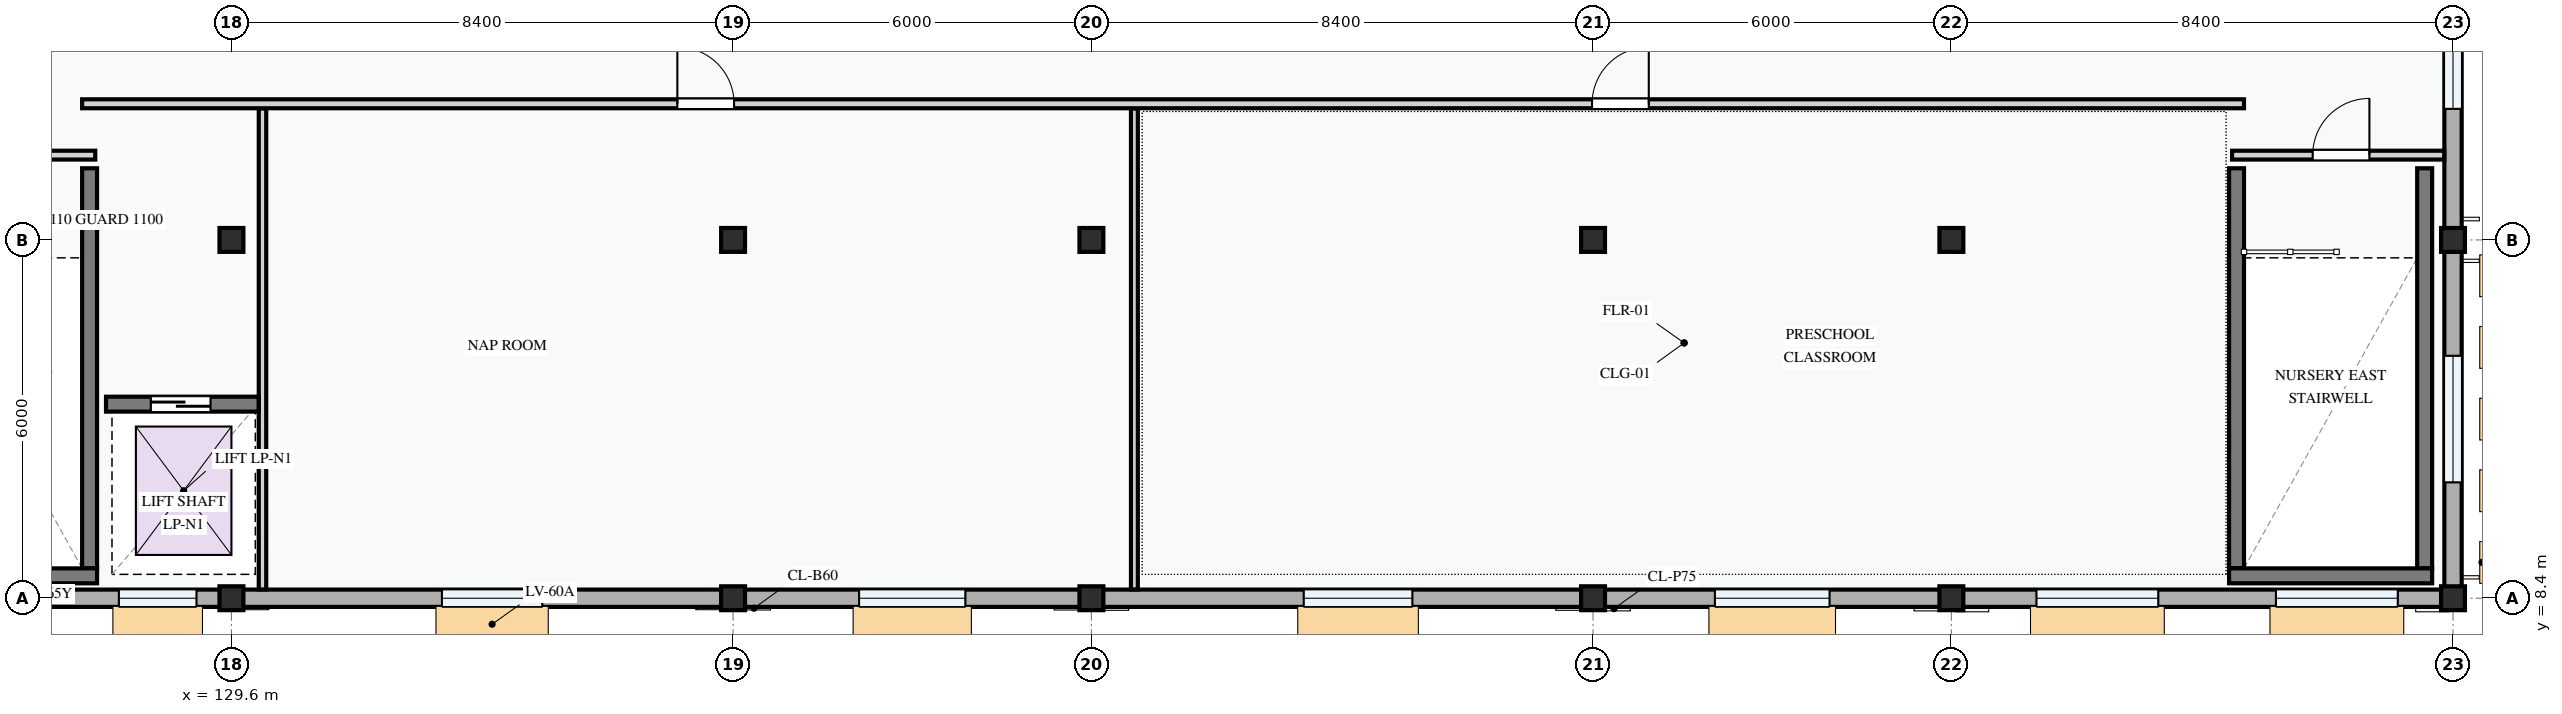
"""IFC4 building model, lengths in metres.
Left out: names, types, materials, properties, quantities, classifications, styles, units other than length and angle.
Written with IfcOpenShell. Run it as: python <this file> out.ifc"""

import sys

from ifc_helpers import new_model, si_unit, direction, frame, frame_2d, origin, origin_2d, place, context, subcontext, project, spatial, rectangle, extrude, element, fill, save


model = new_model("IFC4")
c1 = context("Model", 3, precision=1e-05, world=origin(), true_north=direction((0.0, 1.0)))
c2 = subcontext(c1, "Body", "Model", "MODEL_VIEW")
j1 = project(units=[si_unit("LENGTHUNIT", "METRE"), si_unit("PLANEANGLEUNIT", "RADIAN")], contexts=[c1])
p1 = place(None, origin())
s1 = spatial("IfcSite", under=j1, at=p1, CompositionType="ELEMENT")
p2 = place(p1, origin())
s2 = spatial("IfcBuilding", under=s1, at=p2, CompositionType="ELEMENT")
p3 = place(p2, frame((0.0, 0.0, 4.5)))
s3 = spatial("IfcBuildingStorey", under=s2, at=p3, CompositionType="ELEMENT", Elevation=4.5)
for number, where, z_axis, x_axis in (
    (1, (129.6, 8.4, 0.0), (0.0, 0.0, 1.0), (1.0, 0.0, 0.0)),
    (2, (129.6, 14.4, 0.0), (0.0, 0.0, 1.0), (1.0, 0.0, 0.0)),
    (3, (138.0, 8.4, 0.0), (0.0, 0.0, 1.0), (1.0, 0.0, 0.0)),
    (4, (138.0, 14.4, 0.0), (0.0, 0.0, 1.0), (1.0, 0.0, 0.0)),
    (5, (144.0, 8.4, 0.0), (0.0, 0.0, 1.0), (1.0, 0.0, 0.0)),
    (6, (144.0, 14.4, 0.0), (0.0, 0.0, 1.0), (1.0, 0.0, 0.0)),
    (7, (152.4, 8.4, 0.0), (0.0, 0.0, 1.0), (1.0, 0.0, 0.0)),
    (8, (152.4, 14.4, 0.0), (0.0, 0.0, 1.0), (1.0, 0.0, 0.0)),
    (9, (158.4, 8.4, 0.0), (0.0, 0.0, 1.0), (1.0, 0.0, 0.0)),
    (10, (158.4, 14.4, 0.0), (0.0, 0.0, 1.0), (1.0, 0.0, 0.0)),
    (11, (166.8, 8.4, 0.0), (0.0, 0.0, 1.0), (1.0, 0.0, 0.0)),
    (12, (166.8, 14.4, 0.0), (0.0, 0.0, 1.0), (1.0, 0.0, 0.0)),
):
    element("IfcColumn", number, at=place(p3, frame(where, z_axis=z_axis, x_axis=x_axis)), inside=s3, PredefinedType="COLUMN", context=c2, shape_type="SweptSolid", body=[
        extrude(rectangle(XDim=0.4, YDim=0.4, at=origin_2d()), origin(), (0.0, 0.0, 1.0), 3.6),
    ])
p4 = place(p3, frame((123.6, 8.4, 0.0), z_axis=(0.0, 0.0, 1.0), x_axis=(1.0, 0.0, 0.0)))
e13 = element("IfcWall", 13, at=p4, inside=s3, PredefinedType="STANDARD", context=c2, shape_type="SweptSolid", body=[
    extrude(rectangle(XDim=6.0, YDim=0.29, at=frame_2d((3.0, 0.0))), origin(), (0.0, 0.0, 1.0), 2.775),
])
p5 = place(p4, frame((1.145, 0.0, 0.72)))
e14 = element("IfcOpeningElement", 14, at=p5, cuts=e13, PredefinedType="OPENING", context=c2, shape_type="SweptSolid", body=[
    extrude(rectangle(XDim=1.62, YDim=1.38, at=frame_2d((0.81, 0.69))), frame((0.0, 0.155, 0.0), z_axis=(0.0, -1.0, 0.0), x_axis=(1.0, 0.0, 0.0)), (0.0, 0.0, 1.0), 0.31),
])
p6 = place(p4, frame((4.115, 0.0, 0.72)))
e15 = element("IfcOpeningElement", 15, at=p6, cuts=e13, PredefinedType="OPENING", context=c2, shape_type="SweptSolid", body=[
    extrude(rectangle(XDim=1.3, YDim=1.4, at=frame_2d((0.65, 0.7))), frame((0.0, 0.155, 0.0), z_axis=(0.0, -1.0, 0.0), x_axis=(1.0, 0.0, 0.0)), (0.0, 0.0, 1.0), 0.31),
])
p7 = place(p3, frame((129.6, 8.4, 0.0), z_axis=(0.0, 0.0, 1.0), x_axis=(1.0, 0.0, 0.0)))
e16 = element("IfcWall", 16, at=p7, inside=s3, PredefinedType="STANDARD", context=c2, shape_type="SweptSolid", body=[
    extrude(rectangle(XDim=8.4, YDim=0.29, at=frame_2d((4.2, 0.0))), origin(), (0.0, 0.0, 1.0), 2.675),
])
p8 = place(p7, frame((3.525, 0.0, 0.72)))
e17 = element("IfcOpeningElement", 17, at=p8, cuts=e16, PredefinedType="OPENING", context=c2, shape_type="SweptSolid", body=[
    extrude(rectangle(XDim=1.68, YDim=1.46, at=frame_2d((0.84, 0.73))), frame((0.0, 0.155, 0.0), z_axis=(0.0, -1.0, 0.0), x_axis=(1.0, 0.0, 0.0)), (0.0, 0.0, 1.0), 0.31),
])
p9 = place(p3, frame((138.0, 8.4, 0.0), z_axis=(0.0, 0.0, 1.0), x_axis=(1.0, 0.0, 0.0)))
e18 = element("IfcWall", 18, at=p9, inside=s3, PredefinedType="STANDARD", context=c2, shape_type="SweptSolid", body=[
    extrude(rectangle(XDim=6.0, YDim=0.29, at=frame_2d((3.0, 0.0))), origin(), (0.0, 0.0, 1.0), 2.775),
])
p10 = place(p9, frame((2.11, 0.0, 0.72)))
e19 = element("IfcOpeningElement", 19, at=p10, cuts=e18, PredefinedType="OPENING", context=c2, shape_type="SweptSolid", body=[
    extrude(rectangle(XDim=1.78, YDim=1.42, at=frame_2d((0.89, 0.71))), frame((0.0, 0.155, 0.0), z_axis=(0.0, -1.0, 0.0), x_axis=(1.0, 0.0, 0.0)), (0.0, 0.0, 1.0), 0.31),
])
p11 = place(p3, frame((144.0, 8.4, 0.0), z_axis=(0.0, 0.0, 1.0), x_axis=(1.0, 0.0, 0.0)))
e20 = element("IfcWall", 20, at=p11, inside=s3, PredefinedType="STANDARD", context=c2, shape_type="SweptSolid", body=[
    extrude(rectangle(XDim=8.4, YDim=0.29, at=frame_2d((4.2, 0.0))), origin(), (0.0, 0.0, 1.0), 2.675),
])
p12 = place(p11, frame((3.555, 0.0, 0.72)))
e21 = element("IfcOpeningElement", 21, at=p12, cuts=e20, PredefinedType="OPENING", context=c2, shape_type="SweptSolid", body=[
    extrude(rectangle(XDim=1.82, YDim=1.46, at=frame_2d((0.91, 0.73))), frame((0.0, 0.155, 0.0), z_axis=(0.0, -1.0, 0.0), x_axis=(1.0, 0.0, 0.0)), (0.0, 0.0, 1.0), 0.31),
])
p13 = place(p3, frame((152.4, 8.4, 0.0), z_axis=(0.0, 0.0, 1.0), x_axis=(1.0, 0.0, 0.0)))
e22 = element("IfcWall", 22, at=p13, inside=s3, PredefinedType="STANDARD", context=c2, shape_type="SweptSolid", body=[
    extrude(rectangle(XDim=6.0, YDim=0.29, at=frame_2d((3.0, 0.0))), origin(), (0.0, 0.0, 1.0), 2.775),
])
p14 = place(p13, frame((2.04, 0.0, 0.72)))
e23 = element("IfcOpeningElement", 23, at=p14, cuts=e22, PredefinedType="OPENING", context=c2, shape_type="SweptSolid", body=[
    extrude(rectangle(XDim=1.92, YDim=1.44, at=frame_2d((0.96, 0.72))), frame((0.0, 0.155, 0.0), z_axis=(0.0, -1.0, 0.0), x_axis=(1.0, 0.0, 0.0)), (0.0, 0.0, 1.0), 0.31),
])
p15 = place(p3, frame((158.4, 8.4, 0.0), z_axis=(0.0, 0.0, 1.0), x_axis=(1.0, 0.0, 0.0)))
e24 = element("IfcWall", 24, at=p15, inside=s3, PredefinedType="STANDARD", context=c2, shape_type="SweptSolid", body=[
    extrude(rectangle(XDim=8.4, YDim=0.29, at=frame_2d((4.2, 0.0))), origin(), (0.0, 0.0, 1.0), 2.675),
])
p16 = place(p15, frame((1.425, 0.0, 0.72)))
e25 = element("IfcOpeningElement", 25, at=p16, cuts=e24, PredefinedType="OPENING", context=c2, shape_type="SweptSolid", body=[
    extrude(rectangle(XDim=2.04, YDim=1.46, at=frame_2d((1.02, 0.73))), frame((0.0, 0.155, 0.0), z_axis=(0.0, -1.0, 0.0), x_axis=(1.0, 0.0, 0.0)), (0.0, 0.0, 1.0), 0.31),
])
p17 = place(p15, frame((5.435, 0.0, 0.72)))
e26 = element("IfcOpeningElement", 26, at=p17, cuts=e24, PredefinedType="OPENING", context=c2, shape_type="SweptSolid", body=[
    extrude(rectangle(XDim=2.04, YDim=1.46, at=frame_2d((1.02, 0.73))), frame((0.0, 0.155, 0.0), z_axis=(0.0, -1.0, 0.0), x_axis=(1.0, 0.0, 0.0)), (0.0, 0.0, 1.0), 0.31),
])
p18 = place(p3, frame((166.8, 8.4, 0.0), z_axis=(0.0, 0.0, 1.0), x_axis=(0.0, 1.0, 0.0)))
e27 = element("IfcWall", 27, at=p18, inside=s3, PredefinedType="STANDARD", context=c2, shape_type="SweptSolid", body=[
    extrude(rectangle(XDim=6.0, YDim=0.29, at=frame_2d((3.0, 0.0))), origin(), (0.0, 0.0, 1.0), 2.875),
])
p19 = place(p18, frame((1.94, 0.0, 0.72)))
e28 = element("IfcOpeningElement", 28, at=p19, cuts=e27, PredefinedType="OPENING", context=c2, shape_type="SweptSolid", body=[
    extrude(rectangle(XDim=2.12, YDim=1.44, at=frame_2d((1.06, 0.72))), frame((0.0, 0.155, 0.0), z_axis=(0.0, -1.0, 0.0), x_axis=(1.0, 0.0, 0.0)), (0.0, 0.0, 1.0), 0.31),
])
p20 = place(p3, frame((166.8, 14.4, 0.0), z_axis=(0.0, 0.0, 1.0), x_axis=(0.0, 1.0, 0.0)))
e29 = element("IfcWall", 29, at=p20, inside=s3, PredefinedType="STANDARD", context=c2, shape_type="SweptSolid", body=[
    extrude(rectangle(XDim=8.4, YDim=0.29, at=frame_2d((4.2, 0.0))), origin(), (0.0, 0.0, 1.0), 2.725),
])
p21 = place(p20, frame((2.195, 0.0, 0.72)))
e30 = element("IfcOpeningElement", 30, at=p21, cuts=e29, PredefinedType="OPENING", context=c2, shape_type="SweptSolid", body=[
    extrude(rectangle(XDim=1.55, YDim=1.4, at=frame_2d((0.775, 0.7))), frame((0.0, 0.155, 0.0), z_axis=(0.0, -1.0, 0.0), x_axis=(1.0, 0.0, 0.0)), (0.0, 0.0, 1.0), 0.31),
])
p22 = place(p20, frame((5.275, 0.0, 0.72)))
e31 = element("IfcOpeningElement", 31, at=p22, cuts=e29, PredefinedType="OPENING", context=c2, shape_type="SweptSolid", body=[
    extrude(rectangle(XDim=2.18, YDim=1.48, at=frame_2d((1.09, 0.74))), frame((0.0, 0.155, 0.0), z_axis=(0.0, -1.0, 0.0), x_axis=(1.0, 0.0, 0.0)), (0.0, 0.0, 1.0), 0.31),
])
p23 = place(p3, frame((127.225, 15.6, 0.0), z_axis=(0.0, 0.0, 1.0), x_axis=(0.0, -1.0, 0.0)))
e32 = element("IfcWall", 32, at=p23, inside=s3, PredefinedType="SHEAR", context=c2, shape_type="SweptSolid", body=[
    extrude(rectangle(XDim=6.7, YDim=0.25, at=frame_2d((3.35, 0.0))), origin(), (0.0, 0.0, 1.0), 3.3),
])
p24 = place(p3, frame((123.95, 8.775, 0.0), z_axis=(0.0, 0.0, 1.0), x_axis=(1.0, 0.0, 0.0)))
e33 = element("IfcWall", 33, at=p24, inside=s3, PredefinedType="SHEAR", context=c2, shape_type="SweptSolid", body=[
    extrude(rectangle(XDim=3.4, YDim=0.25, at=frame_2d((1.7, 0.0))), origin(), (0.0, 0.0, 1.0), 3.3),
])
for number, where, z_axis, x_axis in (
    (34, (163.175, 15.6, 0.0), (0.0, 0.0, 1.0), (0.0, -1.0, 0.0)),
    (35, (166.325, 15.6, 0.0), (0.0, 0.0, 1.0), (0.0, -1.0, 0.0)),
):
    element("IfcWall", number, at=place(p3, frame(where, z_axis=z_axis, x_axis=x_axis)), inside=s3, PredefinedType="SHEAR", context=c2, shape_type="SweptSolid", body=[
        extrude(rectangle(XDim=6.7, YDim=0.25, at=frame_2d((3.35, 0.0))), origin(), (0.0, 0.0, 1.0), 3.3),
    ])
p25 = place(p3, frame((163.05, 8.775, 0.0), z_axis=(0.0, 0.0, 1.0), x_axis=(1.0, 0.0, 0.0)))
e36 = element("IfcWall", 36, at=p25, inside=s3, PredefinedType="SHEAR", context=c2, shape_type="SweptSolid", body=[
    extrude(rectangle(XDim=3.4, YDim=0.25, at=frame_2d((1.7, 0.0))), origin(), (0.0, 0.0, 1.0), 3.3),
])
p26 = place(p3, frame((130.12, 8.547, 0.0), z_axis=(0.0, 0.0, 1.0), x_axis=(0.0, 1.0, 0.0)))
e37 = element("IfcWall", 37, at=p26, inside=s3, PredefinedType="PARTITIONING", context=c2, shape_type="SweptSolid", body=[
    extrude(rectangle(XDim=8.056, YDim=0.125, at=frame_2d((4.028, 0.0))), origin(), (0.0, 0.0, 1.0), 3.3),
])
p27 = place(p3, frame((144.72, 8.547, 0.0), z_axis=(0.0, 0.0, 1.0), x_axis=(0.0, 1.0, 0.0)))
e38 = element("IfcWall", 38, at=p27, inside=s3, PredefinedType="PARTITIONING", context=c2, shape_type="SweptSolid", body=[
    extrude(rectangle(XDim=8.056, YDim=0.115, at=frame_2d((4.028, 0.0))), origin(), (0.0, 0.0, 1.0), 3.3),
])
p28 = place(p3, frame((127.1, 16.68, 0.0), z_axis=(0.0, 0.0, 1.0), x_axis=(1.0, 0.0, 0.0)))
e39 = element("IfcWall", 39, at=p28, inside=s3, PredefinedType="PARTITIONING", context=c2, shape_type="SweptSolid", body=[
    extrude(rectangle(XDim=36.2, YDim=0.15, at=frame_2d((18.1, 0.0))), origin(), (0.0, 0.0, 1.0), 3.3),
])
p29 = place(p28, frame((9.967, 0.0, 0.0)))
e40 = element("IfcOpeningElement", 40, at=p29, cuts=e39, PredefinedType="OPENING", context=c2, shape_type="SweptSolid", body=[
    extrude(rectangle(XDim=0.95, YDim=2.1, at=frame_2d((0.475, 1.05))), frame((0.0, 0.085, 0.0), z_axis=(0.0, -1.0, 0.0), x_axis=(1.0, 0.0, 0.0)), (0.0, 0.0, 1.0), 0.17),
])
p30 = place(p28, frame((25.283, 0.0, 0.0)))
e41 = element("IfcOpeningElement", 41, at=p30, cuts=e39, PredefinedType="OPENING", context=c2, shape_type="SweptSolid", body=[
    extrude(rectangle(XDim=0.95, YDim=2.1, at=frame_2d((0.475, 1.05))), frame((0.0, 0.085, 0.0), z_axis=(0.0, -1.0, 0.0), x_axis=(1.0, 0.0, 0.0)), (0.0, 0.0, 1.0), 0.17),
])
p31 = place(p3, frame((127.5, 11.65, 0.0), z_axis=(0.0, 0.0, 1.0), x_axis=(1.0, 0.0, 0.0)))
e42 = element("IfcWall", 42, at=p31, inside=s3, PredefinedType="SHEAR", context=c2, shape_type="SweptSolid", body=[
    extrude(rectangle(XDim=2.555, YDim=0.25, at=frame_2d((1.278, 0.0))), origin(), (0.0, 0.0, 1.0), 3.3),
])
p32 = place(p31, frame((0.75, 0.0, 0.0)))
e43 = element("IfcOpeningElement", 43, at=p32, cuts=e42, PredefinedType="OPENING", context=c2, shape_type="SweptSolid", body=[
    extrude(rectangle(XDim=1.0, YDim=2.15, at=frame_2d((0.5, 1.075))), frame((0.0, 0.135, 0.0), z_axis=(0.0, -1.0, 0.0), x_axis=(1.0, 0.0, 0.0)), (0.0, 0.0, 1.0), 0.27),
])
p33 = place(p3, frame((123.747, 15.82, 0.0), z_axis=(0.0, 0.0, 1.0), x_axis=(1.0, 0.0, 0.0)))
e44 = element("IfcWall", 44, at=p33, inside=s3, PredefinedType="PARTITIONING", context=c2, shape_type="SweptSolid", body=[
    extrude(rectangle(XDim=3.573, YDim=0.148, at=frame_2d((1.787, 0.0))), origin(), (0.0, 0.0, 1.0), 3.3),
])
p34 = place(p33, frame((1.263, 0.0, 0.0)))
e45 = element("IfcOpeningElement", 45, at=p34, cuts=e44, PredefinedType="OPENING", context=c2, shape_type="SweptSolid", body=[
    extrude(rectangle(XDim=0.95, YDim=2.1, at=frame_2d((0.475, 1.05))), frame((0.0, 0.084, 0.0), z_axis=(0.0, -1.0, 0.0), x_axis=(1.0, 0.0, 0.0)), (0.0, 0.0, 1.0), 0.168),
])
p35 = place(p3, frame((163.1, 15.82, 0.0), z_axis=(0.0, 0.0, 1.0), x_axis=(1.0, 0.0, 0.0)))
e46 = element("IfcWall", 46, at=p35, inside=s3, PredefinedType="PARTITIONING", context=c2, shape_type="SweptSolid", body=[
    extrude(rectangle(XDim=3.553, YDim=0.148, at=frame_2d((1.776, 0.0))), origin(), (0.0, 0.0, 1.0), 3.3),
])
p36 = place(p35, frame((1.35, 0.0, 0.0)))
e47 = element("IfcOpeningElement", 47, at=p36, cuts=e46, PredefinedType="OPENING", context=c2, shape_type="SweptSolid", body=[
    extrude(rectangle(XDim=0.95, YDim=2.1, at=frame_2d((0.475, 1.05))), frame((0.0, 0.084, 0.0), z_axis=(0.0, -1.0, 0.0), x_axis=(1.0, 0.0, 0.0)), (0.0, 0.0, 1.0), 0.168),
])
p37 = place(p6, origin())
e48 = element("IfcWindow", 48, at=p37, inside=s3, PartitioningType="SINGLE_PANEL", PredefinedType="WINDOW", context=c2, shape_type="SweptSolid", body=[
    extrude(rectangle(XDim=1.3, YDim=1.4, at=frame_2d((0.65, 0.7))), frame((0.0, 0.03, 0.0), z_axis=(0.0, -1.0, 0.0), x_axis=(1.0, 0.0, 0.0)), (0.0, 0.0, 1.0), 0.06),
])
fill(e15, e48)
p38 = place(p8, origin())
e49 = element("IfcWindow", 49, at=p38, inside=s3, PartitioningType="DOUBLE_PANEL_VERTICAL", PredefinedType="WINDOW", context=c2, shape_type="SweptSolid", body=[
    extrude(rectangle(XDim=1.68, YDim=1.46, at=frame_2d((0.84, 0.73))), frame((0.0, 0.03, 0.0), z_axis=(0.0, -1.0, 0.0), x_axis=(1.0, 0.0, 0.0)), (0.0, 0.0, 1.0), 0.06),
])
fill(e17, e49)
p39 = place(p10, origin())
e50 = element("IfcWindow", 50, at=p39, inside=s3, PartitioningType="DOUBLE_PANEL_VERTICAL", PredefinedType="WINDOW", context=c2, shape_type="SweptSolid", body=[
    extrude(rectangle(XDim=1.78, YDim=1.42, at=frame_2d((0.89, 0.71))), frame((0.0, 0.03, 0.0), z_axis=(0.0, -1.0, 0.0), x_axis=(1.0, 0.0, 0.0)), (0.0, 0.0, 1.0), 0.06),
])
fill(e19, e50)
p40 = place(p12, origin())
e51 = element("IfcWindow", 51, at=p40, inside=s3, PartitioningType="DOUBLE_PANEL_VERTICAL", PredefinedType="WINDOW", context=c2, shape_type="SweptSolid", body=[
    extrude(rectangle(XDim=1.82, YDim=1.46, at=frame_2d((0.91, 0.73))), frame((0.0, 0.03, 0.0), z_axis=(0.0, -1.0, 0.0), x_axis=(1.0, 0.0, 0.0)), (0.0, 0.0, 1.0), 0.06),
])
fill(e21, e51)
p41 = place(p14, origin())
e52 = element("IfcWindow", 52, at=p41, inside=s3, PartitioningType="DOUBLE_PANEL_VERTICAL", PredefinedType="WINDOW", context=c2, shape_type="SweptSolid", body=[
    extrude(rectangle(XDim=1.92, YDim=1.44, at=frame_2d((0.96, 0.72))), frame((0.0, 0.03, 0.0), z_axis=(0.0, -1.0, 0.0), x_axis=(1.0, 0.0, 0.0)), (0.0, 0.0, 1.0), 0.06),
])
fill(e23, e52)
p42 = place(p16, origin())
e53 = element("IfcWindow", 53, at=p42, inside=s3, PartitioningType="DOUBLE_PANEL_VERTICAL", PredefinedType="WINDOW", context=c2, shape_type="SweptSolid", body=[
    extrude(rectangle(XDim=2.04, YDim=1.46, at=frame_2d((1.02, 0.73))), frame((0.0, 0.03, 0.0), z_axis=(0.0, -1.0, 0.0), x_axis=(1.0, 0.0, 0.0)), (0.0, 0.0, 1.0), 0.06),
])
fill(e25, e53)
p43 = place(p17, origin())
e54 = element("IfcWindow", 54, at=p43, inside=s3, PartitioningType="DOUBLE_PANEL_VERTICAL", PredefinedType="WINDOW", context=c2, shape_type="SweptSolid", body=[
    extrude(rectangle(XDim=2.04, YDim=1.46, at=frame_2d((1.02, 0.73))), frame((0.0, 0.03, 0.0), z_axis=(0.0, -1.0, 0.0), x_axis=(1.0, 0.0, 0.0)), (0.0, 0.0, 1.0), 0.06),
])
fill(e26, e54)
p44 = place(p19, origin())
e55 = element("IfcWindow", 55, at=p44, inside=s3, PartitioningType="DOUBLE_PANEL_VERTICAL", PredefinedType="WINDOW", context=c2, shape_type="SweptSolid", body=[
    extrude(rectangle(XDim=2.12, YDim=1.44, at=frame_2d((1.06, 0.72))), frame((0.0, 0.03, 0.0), z_axis=(0.0, -1.0, 0.0), x_axis=(1.0, 0.0, 0.0)), (0.0, 0.0, 1.0), 0.06),
])
fill(e28, e55)
p45 = place(p21, origin())
e56 = element("IfcWindow", 56, at=p45, inside=s3, PartitioningType="SINGLE_PANEL", PredefinedType="WINDOW", context=c2, shape_type="SweptSolid", body=[
    extrude(rectangle(XDim=1.55, YDim=1.4, at=frame_2d((0.775, 0.7))), frame((0.0, 0.03, 0.0), z_axis=(0.0, -1.0, 0.0), x_axis=(1.0, 0.0, 0.0)), (0.0, 0.0, 1.0), 0.06),
])
fill(e30, e56)
p46 = place(p29, origin())
e57 = element("IfcDoor", 57, at=p46, inside=s3, OperationType="SINGLE_SWING_LEFT", PredefinedType="DOOR", context=c2, shape_type="SweptSolid", body=[
    extrude(rectangle(XDim=0.95, YDim=2.1, at=frame_2d((0.475, 1.05))), frame((0.0, 0.025, 0.0), z_axis=(0.0, -1.0, 0.0), x_axis=(1.0, 0.0, 0.0)), (0.0, 0.0, 1.0), 0.05),
])
fill(e40, e57)
p47 = place(p30, origin())
e58 = element("IfcDoor", 58, at=p47, inside=s3, OperationType="SINGLE_SWING_RIGHT", PredefinedType="DOOR", context=c2, shape_type="SweptSolid", body=[
    extrude(rectangle(XDim=0.95, YDim=2.1, at=frame_2d((0.475, 1.05))), frame((0.0, 0.025, 0.0), z_axis=(0.0, -1.0, 0.0), x_axis=(1.0, 0.0, 0.0)), (0.0, 0.0, 1.0), 0.05),
])
fill(e41, e58)
p48 = place(p32, origin())
e59 = element("IfcDoor", 59, at=p48, inside=s3, OperationType="SLIDING_TO_LEFT", PredefinedType="DOOR", context=c2, shape_type="SweptSolid", body=[
    extrude(rectangle(XDim=1.0, YDim=2.15, at=frame_2d((0.5, 1.075))), frame((0.0, 0.025, 0.0), z_axis=(0.0, -1.0, 0.0), x_axis=(1.0, 0.0, 0.0)), (0.0, 0.0, 1.0), 0.05),
])
fill(e43, e59)
p49 = place(p36, origin())
e60 = element("IfcDoor", 60, at=p49, inside=s3, OperationType="SINGLE_SWING_RIGHT", PredefinedType="DOOR", context=c2, shape_type="SweptSolid", body=[
    extrude(rectangle(XDim=0.95, YDim=2.1, at=frame_2d((0.475, 1.05))), frame((0.0, 0.025, 0.0), z_axis=(0.0, -1.0, 0.0), x_axis=(1.0, 0.0, 0.0)), (0.0, 0.0, 1.0), 0.05),
])
fill(e47, e60)
save(model, sys.argv[1])
